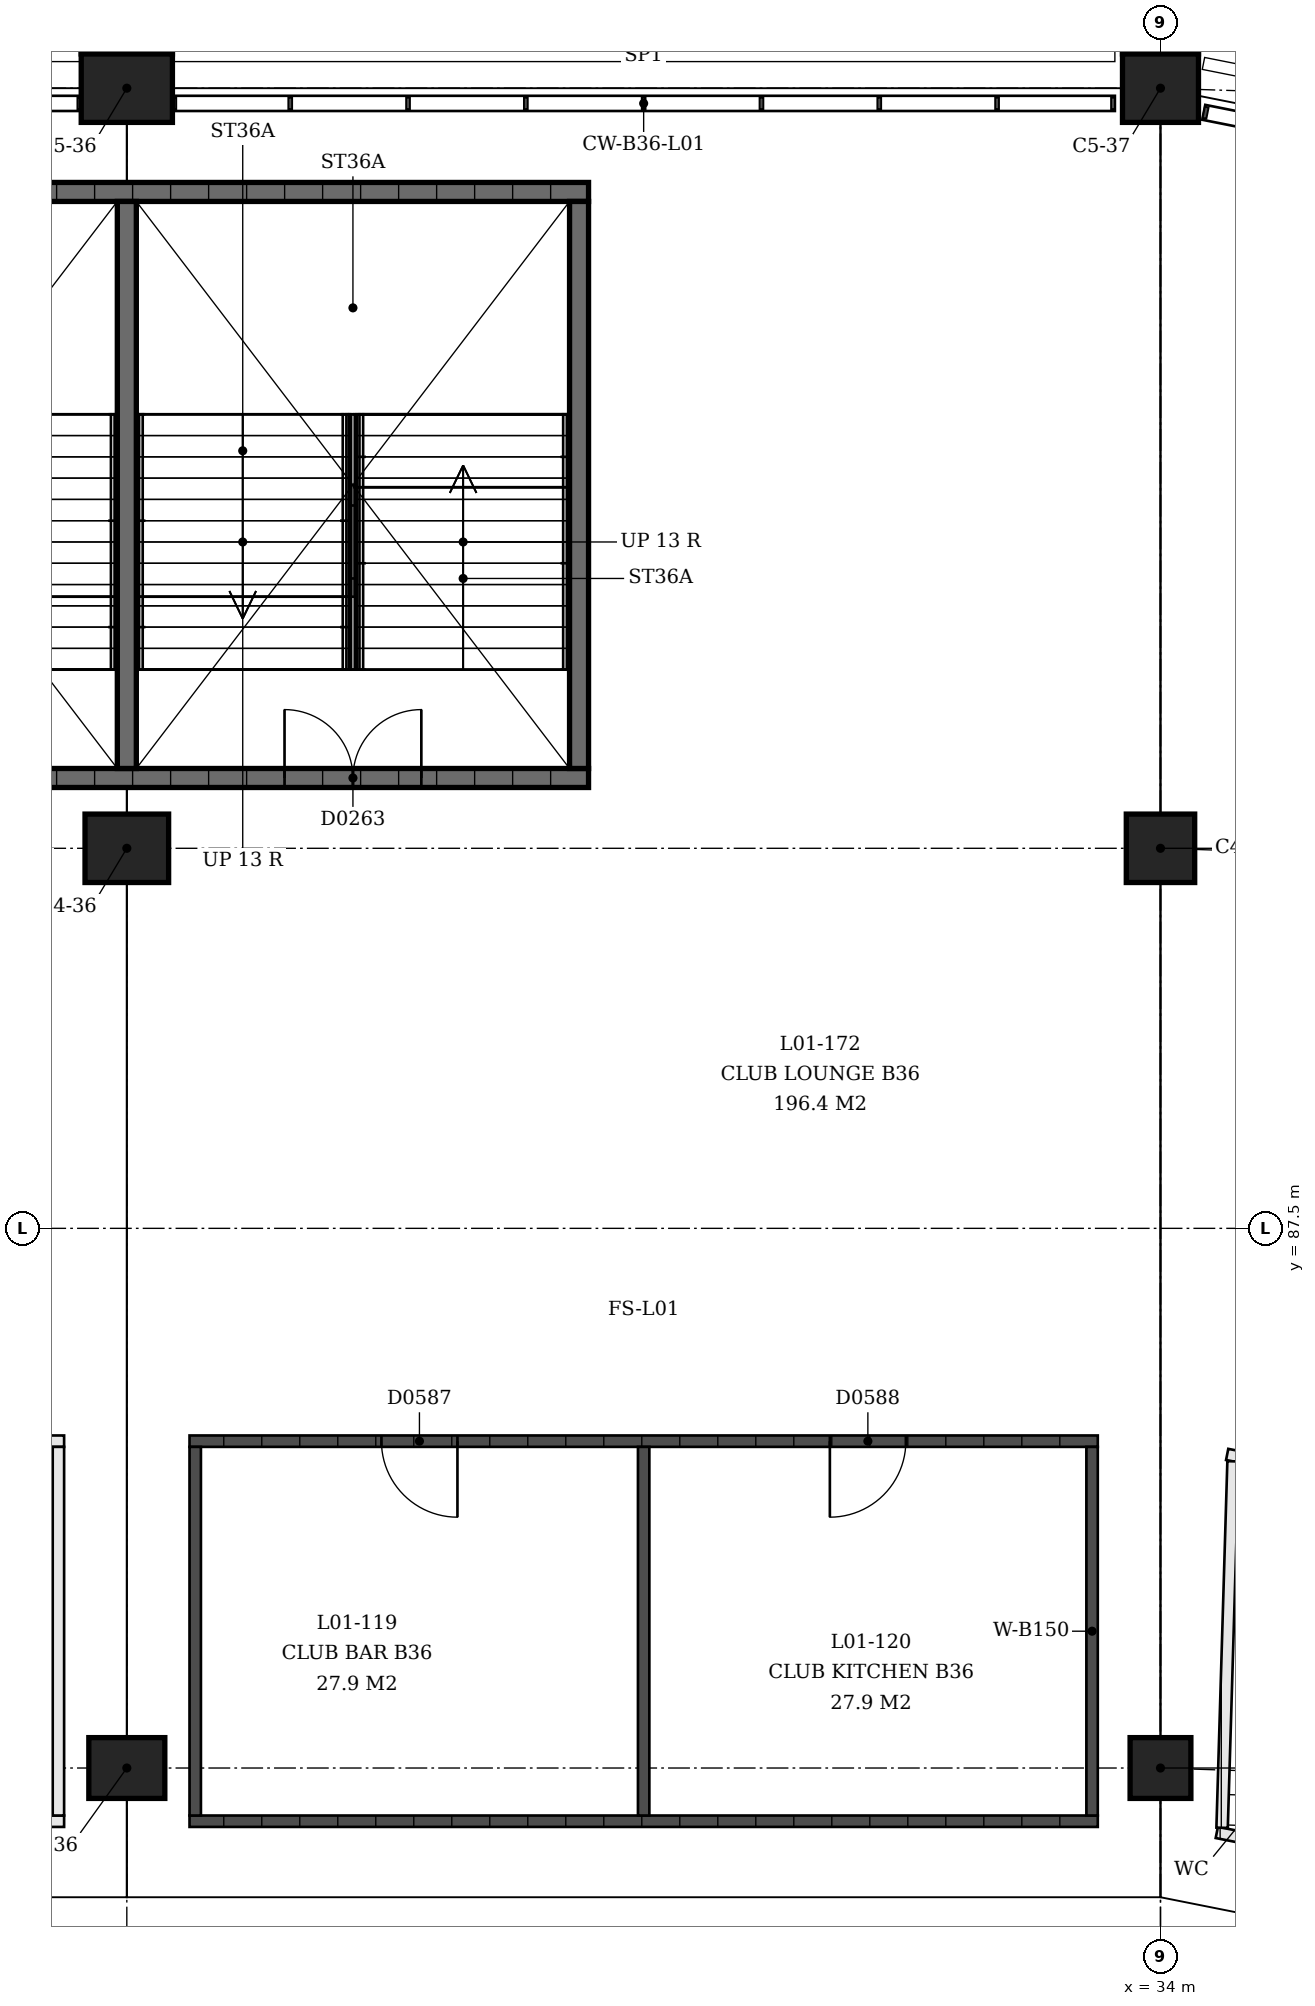
"""IFC4 building model, lengths in metres.
Left out: names, types, materials, properties, quantities, classifications, styles, units other than length and angle.
Written with IfcOpenShell. Run it as: python <this file> out.ifc"""

import sys

from ifc_helpers import new_model, si_unit, direction, frame, frame_2d, origin, origin_2d, place, context, subcontext, project, spatial, rectangle, extrude, element, fill, save


model = new_model("IFC4")
c1 = context("Model", 3, precision=1e-05, world=origin(), true_north=direction((0.0, 1.0)))
c2 = subcontext(c1, "Body", "Model", "MODEL_VIEW")
j1 = project(units=[si_unit("LENGTHUNIT", "METRE"), si_unit("PLANEANGLEUNIT", "RADIAN")], contexts=[c1])
p1 = place(None, origin())
s1 = spatial("IfcSite", under=j1, at=p1, CompositionType="ELEMENT")
p2 = place(p1, origin())
s2 = spatial("IfcBuilding", under=s1, at=p2, CompositionType="ELEMENT")
p3 = place(p2, frame((0.0, 0.0, 4.5)))
s3 = spatial("IfcBuildingStorey", under=s2, at=p3, CompositionType="ELEMENT", Elevation=4.5)
p4 = place(p3, frame((20.4, 80.4, 0.0), z_axis=(0.0, 0.0, 1.0), x_axis=(-1.0, 0.0, 0.0)))
e1 = element("IfcColumn", 1, at=p4, inside=s3, PredefinedType="COLUMN", context=c2, shape_type="SweptSolid", body=[
    extrude(rectangle(XDim=1.0, YDim=0.8, at=origin_2d()), origin(), (0.0, 0.0, 1.0), 4.5),
])
p5 = place(p3, frame((20.4, 92.5, 0.0), z_axis=(0.0, 0.0, 1.0), x_axis=(-1.0, 0.0, 0.0)))
e2 = element("IfcColumn", 2, at=p5, inside=s3, PredefinedType="COLUMN", context=c2, shape_type="SweptSolid", body=[
    extrude(rectangle(XDim=1.1, YDim=0.9, at=origin_2d()), origin(), (0.0, 0.0, 1.0), 4.5),
])
p6 = place(p3, frame((20.4, 102.5, 0.0), z_axis=(0.0, 0.0, 1.0), x_axis=(-1.0, 0.0, 0.0)))
e3 = element("IfcColumn", 3, at=p6, inside=s3, PredefinedType="COLUMN", context=c2, shape_type="SweptSolid", body=[
    extrude(rectangle(XDim=1.2, YDim=0.9, at=origin_2d()), origin(), (0.0, 0.0, 1.0), 4.5),
])
p7 = place(p3, frame((34.0, 80.4, 0.0), z_axis=(0.0, 0.0, 1.0), x_axis=(-1.0, 0.0, 0.0)))
e4 = element("IfcColumn", 4, at=p7, inside=s3, PredefinedType="COLUMN", context=c2, shape_type="SweptSolid", body=[
    extrude(rectangle(XDim=0.8, YDim=0.8, at=origin_2d()), origin(), (0.0, 0.0, 1.0), 4.5),
])
p8 = place(p3, frame((34.0, 92.5, 0.0), z_axis=(0.0, 0.0, 1.0), x_axis=(-1.0, 0.0, 0.0)))
e5 = element("IfcColumn", 5, at=p8, inside=s3, PredefinedType="COLUMN", context=c2, shape_type="SweptSolid", body=[
    extrude(rectangle(XDim=0.9, YDim=0.9, at=origin_2d()), origin(), (0.0, 0.0, 1.0), 4.5),
])
p9 = place(p3, frame((34.0, 102.5, 0.0), z_axis=(0.0, 0.0, 1.0), x_axis=(-1.0, 0.0, 0.0)))
e6 = element("IfcColumn", 6, at=p9, inside=s3, PredefinedType="COLUMN", context=c2, shape_type="SweptSolid", body=[
    extrude(rectangle(XDim=1.0, YDim=0.9, at=origin_2d()), origin(), (0.0, 0.0, 1.0), 4.5),
])
p10 = place(p3, frame((26.475, 93.425, 0.0), z_axis=(0.0, 0.0, 1.0), x_axis=(-1.0, 0.0, 0.0)))
e7 = element("IfcWall", 7, at=p10, inside=s3, PredefinedType="SHEAR", context=c2, shape_type="SweptSolid", body=[
    extrude(rectangle(XDim=12.15, YDim=0.25, at=frame_2d((6.075, 0.0))), origin(), (0.0, 0.0, 1.0), 4.09),
])
p11 = place(p10, frame((2.2, 0.0, 0.0)))
e8 = element("IfcOpeningElement", 8, at=p11, cuts=e7, PredefinedType="OPENING", context=c2, shape_type="SweptSolid", body=[
    extrude(rectangle(XDim=1.8, YDim=2.1, at=frame_2d((0.9, 1.05))), frame((0.0, 0.125, 0.0), z_axis=(0.0, -1.0, 0.0), x_axis=(1.0, 0.0, 0.0)), (0.0, 0.0, 1.0), 0.25),
])
p12 = place(p10, frame((8.15, 0.0, 0.0)))
e9 = element("IfcOpeningElement", 9, at=p12, cuts=e7, PredefinedType="OPENING", context=c2, shape_type="SweptSolid", body=[
    extrude(rectangle(XDim=1.8, YDim=2.1, at=frame_2d((0.9, 1.05))), frame((0.0, 0.125, 0.0), z_axis=(0.0, -1.0, 0.0), x_axis=(1.0, 0.0, 0.0)), (0.0, 0.0, 1.0), 0.25),
])
p13 = place(p3, frame((26.475, 101.135, 0.0), z_axis=(0.0, 0.0, 1.0), x_axis=(-1.0, 0.0, 0.0)))
e10 = element("IfcWall", 10, at=p13, inside=s3, PredefinedType="SHEAR", context=c2, shape_type="SweptSolid", body=[
    extrude(rectangle(XDim=12.15, YDim=0.25, at=frame_2d((6.075, 0.0))), origin(), (0.0, 0.0, 1.0), 4.09),
])
for number, where, z_axis, x_axis in (
    (11, (26.35, 93.55, 0.0), (0.0, 0.0, 1.0), (0.0, 1.0, 0.0)),
    (12, (20.4, 93.55, 0.0), (0.0, 0.0, 1.0), (0.0, 1.0, 0.0)),
):
    element("IfcWall", number, at=place(p3, frame(where, z_axis=z_axis, x_axis=x_axis)), inside=s3, PredefinedType="SHEAR", context=c2, shape_type="SweptSolid", body=[
        extrude(rectangle(XDim=7.46, YDim=0.25, at=frame_2d((3.73, 0.0))), origin(), (0.0, 0.0, 1.0), 4.09),
    ])
p14 = place(p3, frame((19.575, 79.7, 0.0), z_axis=(0.0, 0.0, 1.0), x_axis=(-1.0, 0.0, 0.0)))
e13 = element("IfcWall", 13, at=p14, inside=s3, PredefinedType="PARTITIONING", context=c2, shape_type="SweptSolid", body=[
    extrude(rectangle(XDim=11.95, YDim=0.15, at=frame_2d((5.975, 0.0))), origin(), (0.0, 0.0, 1.0), 3.0),
])
p15 = place(p3, frame((19.575, 84.7, 0.0), z_axis=(0.0, 0.0, 1.0), x_axis=(-1.0, 0.0, 0.0)))
e14 = element("IfcWall", 14, at=p15, inside=s3, PredefinedType="PARTITIONING", context=c2, shape_type="SweptSolid", body=[
    extrude(rectangle(XDim=11.95, YDim=0.15, at=frame_2d((5.975, 0.0))), origin(), (0.0, 0.0, 1.0), 3.0),
])
p16 = place(p15, frame((1.454, 0.0, 0.0)))
e15 = element("IfcOpeningElement", 15, at=p16, cuts=e14, PredefinedType="OPENING", context=c2, shape_type="SweptSolid", body=[
    extrude(rectangle(XDim=0.9, YDim=2.1, at=frame_2d((0.45, 1.05))), frame((0.0, 0.075, 0.0), z_axis=(0.0, -1.0, 0.0), x_axis=(1.0, 0.0, 0.0)), (0.0, 0.0, 1.0), 0.15),
])
p17 = place(p15, frame((5.112, 0.0, 0.0)))
e16 = element("IfcOpeningElement", 16, at=p17, cuts=e14, PredefinedType="OPENING", context=c2, shape_type="SweptSolid", body=[
    extrude(rectangle(XDim=0.9, YDim=2.1, at=frame_2d((0.45, 1.05))), frame((0.0, 0.075, 0.0), z_axis=(0.0, -1.0, 0.0), x_axis=(1.0, 0.0, 0.0)), (0.0, 0.0, 1.0), 0.15),
])
p18 = place(p15, frame((7.962, 0.0, 0.0)))
e17 = element("IfcOpeningElement", 17, at=p18, cuts=e14, PredefinedType="OPENING", context=c2, shape_type="SweptSolid", body=[
    extrude(rectangle(XDim=1.1, YDim=2.1, at=frame_2d((0.55, 1.05))), frame((0.0, 0.075, 0.0), z_axis=(0.0, -1.0, 0.0), x_axis=(1.0, 0.0, 0.0)), (0.0, 0.0, 1.0), 0.15),
])
p19 = place(p15, frame((10.204, 0.0, 0.0)))
e18 = element("IfcOpeningElement", 18, at=p19, cuts=e14, PredefinedType="OPENING", context=c2, shape_type="SweptSolid", body=[
    extrude(rectangle(XDim=1.1, YDim=2.1, at=frame_2d((0.55, 1.05))), frame((0.0, 0.075, 0.0), z_axis=(0.0, -1.0, 0.0), x_axis=(1.0, 0.0, 0.0)), (0.0, 0.0, 1.0), 0.15),
])
p20 = place(p3, frame((19.5, 79.775, 0.0), z_axis=(0.0, 0.0, 1.0), x_axis=(0.0, 1.0, 0.0)))
e19 = element("IfcWall", 19, at=p20, inside=s3, PredefinedType="PARTITIONING", context=c2, shape_type="SweptSolid", body=[
    extrude(rectangle(XDim=4.85, YDim=0.15, at=frame_2d((2.425, 0.0))), origin(), (0.0, 0.0, 1.0), 3.0),
])
p21 = place(p3, frame((21.225, 79.7, 0.0), z_axis=(0.0, 0.0, 1.0), x_axis=(1.0, 0.0, 0.0)))
e20 = element("IfcWall", 20, at=p21, inside=s3, PredefinedType="SOLIDWALL", context=c2, shape_type="SweptSolid", body=[
    extrude(rectangle(XDim=11.95, YDim=0.15, at=frame_2d((5.975, 0.0))), origin(), (0.0, 0.0, 1.0), 3.0),
])
p22 = place(p3, frame((21.225, 84.7, 0.0), z_axis=(0.0, 0.0, 1.0), x_axis=(1.0, 0.0, 0.0)))
e21 = element("IfcWall", 21, at=p22, inside=s3, PredefinedType="SOLIDWALL", context=c2, shape_type="SweptSolid", body=[
    extrude(rectangle(XDim=11.95, YDim=0.15, at=frame_2d((5.975, 0.0))), origin(), (0.0, 0.0, 1.0), 3.0),
])
p23 = place(p22, frame((2.525, 0.0, 0.0)))
e22 = element("IfcOpeningElement", 22, at=p23, cuts=e21, PredefinedType="OPENING", context=c2, shape_type="SweptSolid", body=[
    extrude(rectangle(XDim=1.0, YDim=2.1, at=frame_2d((0.5, 1.05))), frame((0.0, 0.075, 0.0), z_axis=(0.0, -1.0, 0.0), x_axis=(1.0, 0.0, 0.0)), (0.0, 0.0, 1.0), 0.15),
])
p24 = place(p22, frame((8.425, 0.0, 0.0)))
e23 = element("IfcOpeningElement", 23, at=p24, cuts=e21, PredefinedType="OPENING", context=c2, shape_type="SweptSolid", body=[
    extrude(rectangle(XDim=1.0, YDim=2.1, at=frame_2d((0.5, 1.05))), frame((0.0, 0.075, 0.0), z_axis=(0.0, -1.0, 0.0), x_axis=(1.0, 0.0, 0.0)), (0.0, 0.0, 1.0), 0.15),
])
for number, where, z_axis, x_axis in (
    (24, (21.3, 79.775, 0.0), (0.0, 0.0, 1.0), (0.0, 1.0, 0.0)),
    (25, (27.2, 79.775, 0.0), (0.0, 0.0, 1.0), (0.0, 1.0, 0.0)),
    (26, (33.1, 79.775, 0.0), (0.0, 0.0, 1.0), (0.0, 1.0, 0.0)),
):
    element("IfcWall", number, at=place(p3, frame(where, z_axis=z_axis, x_axis=x_axis)), inside=s3, PredefinedType="SOLIDWALL", context=c2, shape_type="SweptSolid", body=[
        extrude(rectangle(XDim=4.85, YDim=0.15, at=frame_2d((2.425, 0.0))), origin(), (0.0, 0.0, 1.0), 3.0),
    ])
p25 = place(p3, frame((43.668, 77.777, 0.0), z_axis=(0.0, 0.0, 1.0), x_axis=(-0.980786464492, 0.195084369103, 0.0)))
e27 = element("IfcWall", 27, at=p25, inside=s3, PredefinedType="PARTITIONING", context=c2, shape_type="SweptSolid", body=[
    extrude(rectangle(XDim=9.102, YDim=0.15, at=frame_2d((4.551, 0.0))), origin(), (0.0, 0.0, 1.0), 3.0),
])
p26 = place(p3, frame((45.445, 82.423, 0.0), z_axis=(0.0, 0.0, 1.0), x_axis=(-0.98078580384, 0.195087690502, 0.0)))
e28 = element("IfcWall", 28, at=p26, inside=s3, PredefinedType="PARTITIONING", context=c2, shape_type="SweptSolid", body=[
    extrude(rectangle(XDim=10.775, YDim=0.15, at=frame_2d((5.387, 0.0))), origin(), (0.0, 0.0, 1.0), 3.0),
])
p27 = place(p26, frame((1.276, 0.0, 0.0)))
e29 = element("IfcOpeningElement", 29, at=p27, cuts=e28, PredefinedType="OPENING", context=c2, shape_type="SweptSolid", body=[
    extrude(rectangle(XDim=0.9, YDim=2.1, at=frame_2d((0.45, 1.05))), frame((0.0, 0.075, 0.0), z_axis=(0.0, -1.0, 0.0), x_axis=(1.0, 0.0, 0.0)), (0.0, 0.0, 1.0), 0.15),
])
p28 = place(p26, frame((4.566, 0.0, 0.0)))
e30 = element("IfcOpeningElement", 30, at=p28, cuts=e28, PredefinedType="OPENING", context=c2, shape_type="SweptSolid", body=[
    extrude(rectangle(XDim=0.9, YDim=2.1, at=frame_2d((0.45, 1.05))), frame((0.0, 0.075, 0.0), z_axis=(0.0, -1.0, 0.0), x_axis=(1.0, 0.0, 0.0)), (0.0, 0.0, 1.0), 0.15),
])
p29 = place(p26, frame((7.119, 0.0, 0.0)))
e31 = element("IfcOpeningElement", 31, at=p29, cuts=e28, PredefinedType="OPENING", context=c2, shape_type="SweptSolid", body=[
    extrude(rectangle(XDim=1.1, YDim=2.1, at=frame_2d((0.55, 1.05))), frame((0.0, 0.075, 0.0), z_axis=(0.0, -1.0, 0.0), x_axis=(1.0, 0.0, 0.0)), (0.0, 0.0, 1.0), 0.15),
])
p30 = place(p26, frame((9.135, 0.0, 0.0)))
e32 = element("IfcOpeningElement", 32, at=p30, cuts=e28, PredefinedType="OPENING", context=c2, shape_type="SweptSolid", body=[
    extrude(rectangle(XDim=1.1, YDim=2.1, at=frame_2d((0.55, 1.05))), frame((0.0, 0.075, 0.0), z_axis=(0.0, -1.0, 0.0), x_axis=(1.0, 0.0, 0.0)), (0.0, 0.0, 1.0), 0.15),
])
p31 = place(p3, frame((34.811, 79.614, 0.0), z_axis=(0.0, 0.0, 1.0), x_axis=(0.02991368842, 0.999552485488, 0.0)))
e33 = element("IfcWall", 33, at=p31, inside=s3, PredefinedType="PARTITIONING", context=c2, shape_type="SweptSolid", body=[
    extrude(rectangle(XDim=4.823, YDim=0.15, at=frame_2d((2.412, 0.0))), origin(), (0.0, 0.0, 1.0), 3.0),
])
p32 = place(p11, origin())
e34 = element("IfcDoor", 34, at=p32, inside=s3, OperationType="DOUBLE_DOOR_SINGLE_SWING", PredefinedType="DOOR", context=c2, shape_type="SweptSolid", body=[
    extrude(rectangle(XDim=1.8, YDim=2.1, at=frame_2d((0.9, 1.05))), frame((0.0, 0.025, 0.0), z_axis=(0.0, -1.0, 0.0), x_axis=(1.0, 0.0, 0.0)), (0.0, 0.0, 1.0), 0.05),
])
fill(e8, e34)
p33 = place(p23, origin())
e35 = element("IfcDoor", 35, at=p33, inside=s3, OperationType="SINGLE_SWING_RIGHT", PredefinedType="DOOR", context=c2, shape_type="SweptSolid", body=[
    extrude(rectangle(XDim=1.0, YDim=2.1, at=frame_2d((0.5, 1.05))), frame((0.0, 0.025, 0.0), z_axis=(0.0, -1.0, 0.0), x_axis=(1.0, 0.0, 0.0)), (0.0, 0.0, 1.0), 0.05),
])
fill(e22, e35)
p34 = place(p24, origin())
e36 = element("IfcDoor", 36, at=p34, inside=s3, OperationType="SINGLE_SWING_LEFT", PredefinedType="DOOR", context=c2, shape_type="SweptSolid", body=[
    extrude(rectangle(XDim=1.0, YDim=2.1, at=frame_2d((0.5, 1.05))), frame((0.0, 0.025, 0.0), z_axis=(0.0, -1.0, 0.0), x_axis=(1.0, 0.0, 0.0)), (0.0, 0.0, 1.0), 0.05),
])
fill(e23, e36)
save(model, sys.argv[1])
